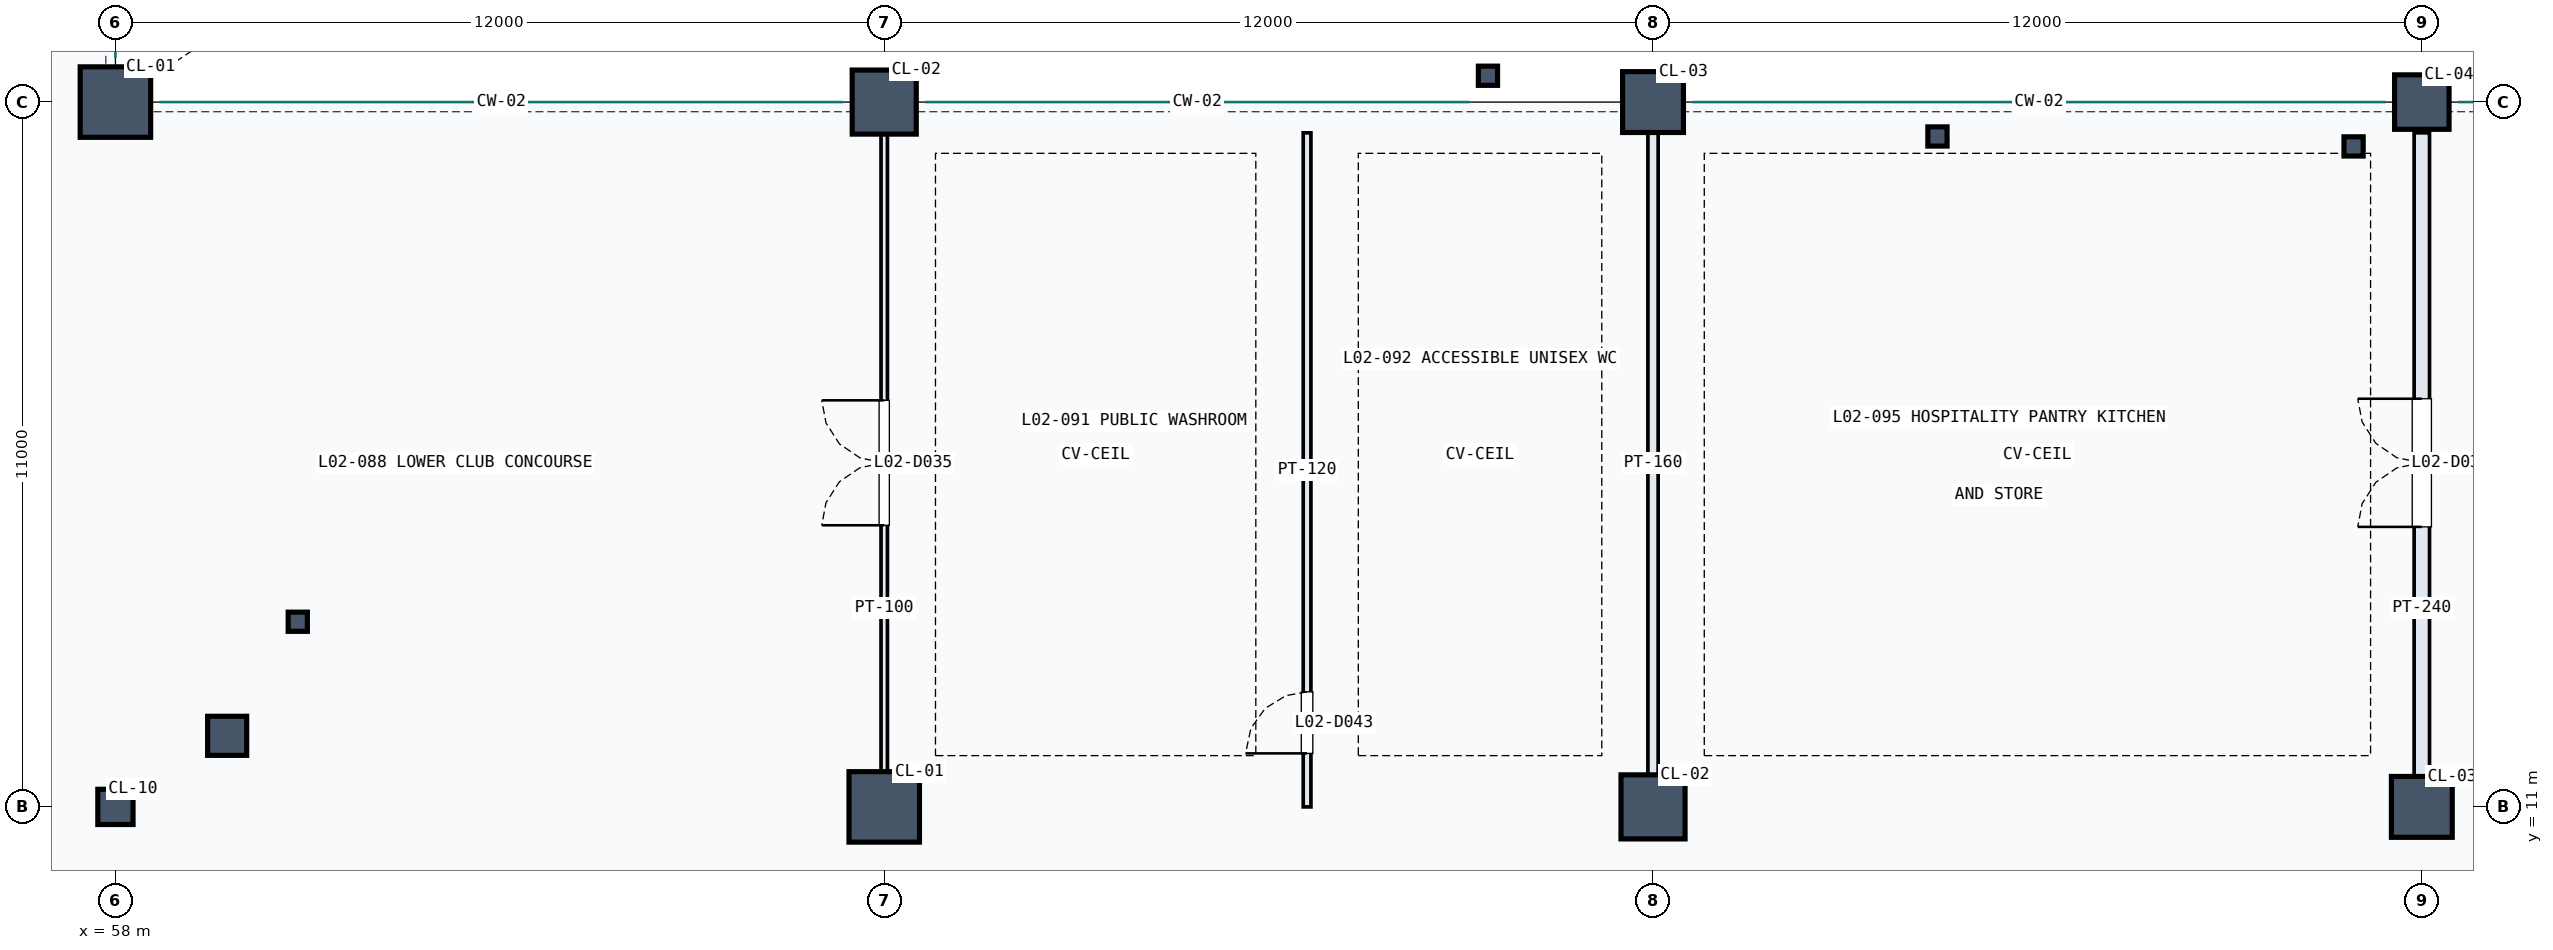
"""IFC4 building model, lengths in metres.
Left out: names, types, materials, properties, quantities, classifications, styles, units other than length and angle.
Written with IfcOpenShell. Run it as: python <this file> out.ifc"""

import sys

from ifc_helpers import new_model, si_unit, direction, frame, frame_2d, origin, origin_2d, place, context, subcontext, project, spatial, rectangle, hollow_rectangle, hollow_circle, extrude, element, fill, save


model = new_model("IFC4")
c1 = context("Model", 3, precision=1e-05, world=origin(), true_north=direction((0.0, 1.0)))
c2 = subcontext(c1, "Body", "Model", "MODEL_VIEW")
j1 = project(units=[si_unit("LENGTHUNIT", "METRE"), si_unit("PLANEANGLEUNIT", "RADIAN")], contexts=[c1])
p1 = place(None, origin())
s1 = spatial("IfcSite", under=j1, at=p1, CompositionType="ELEMENT")
p2 = place(p1, origin())
s2 = spatial("IfcBuilding", under=s1, at=p2, CompositionType="ELEMENT")
p3 = place(p2, frame((0.0, 0.0, 10.2)))
s3 = spatial("IfcBuildingStorey", under=s2, at=p3, CompositionType="ELEMENT", Elevation=10.2)
p4 = place(p3, frame((58.0, 11.0, 0.0), z_axis=(0.0, 0.0, 1.0), x_axis=(1.0, 0.0, 0.0)))
e1 = element("IfcColumn", 1, at=p4, inside=s3, PredefinedType="COLUMN", context=c2, shape_type="SweptSolid", body=[
    extrude(rectangle(XDim=0.55, YDim=0.55, at=origin_2d()), origin(), (0.0, 0.0, 1.0), 4.5),
])
for number, where, z_axis, x_axis in (
    (2, (58.0, 22.0, 0.0), (0.0, 0.0, 1.0), (1.0, 0.0, 0.0)),
    (3, (70.0, 11.0, 0.0), (0.0, 0.0, 1.0), (1.0, 0.0, 0.0)),
):
    element("IfcColumn", number, at=place(p3, frame(where, z_axis=z_axis, x_axis=x_axis)), inside=s3, PredefinedType="COLUMN", context=c2, shape_type="SweptSolid", body=[
        extrude(rectangle(XDim=1.1, YDim=1.1, at=origin_2d()), origin(), (0.0, 0.0, 1.0), 4.5),
    ])
for number, where, z_axis, x_axis in (
    (4, (70.0, 22.0, 0.0), (0.0, 0.0, 1.0), (1.0, 0.0, 0.0)),
    (5, (82.0, 11.0, 0.0), (0.0, 0.0, 1.0), (1.0, 0.0, 0.0)),
):
    element("IfcColumn", number, at=place(p3, frame(where, z_axis=z_axis, x_axis=x_axis)), inside=s3, PredefinedType="COLUMN", context=c2, shape_type="SweptSolid", body=[
        extrude(rectangle(XDim=1.0, YDim=1.0, at=origin_2d()), origin(), (0.0, 0.0, 1.0), 4.5),
    ])
for number, where, z_axis, x_axis in (
    (6, (82.0, 22.0, 0.0), (0.0, 0.0, 1.0), (1.0, 0.0, 0.0)),
    (7, (94.0, 11.0, 0.0), (0.0, 0.0, 1.0), (1.0, 0.0, 0.0)),
):
    element("IfcColumn", number, at=place(p3, frame(where, z_axis=z_axis, x_axis=x_axis)), inside=s3, PredefinedType="COLUMN", context=c2, shape_type="SweptSolid", body=[
        extrude(rectangle(XDim=0.95, YDim=0.95, at=origin_2d()), origin(), (0.0, 0.0, 1.0), 4.5),
    ])
p5 = place(p3, frame((94.0, 22.0, 0.0), z_axis=(0.0, 0.0, 1.0), x_axis=(1.0, 0.0, 0.0)))
e8 = element("IfcColumn", 8, at=p5, inside=s3, PredefinedType="COLUMN", context=c2, shape_type="SweptSolid", body=[
    extrude(rectangle(XDim=0.85, YDim=0.85, at=origin_2d()), origin(), (0.0, 0.0, 1.0), 4.5),
])
p6 = place(p3, frame((59.744, 12.109, 0.0), z_axis=(0.0, 0.0, 1.0), x_axis=(1.0, 0.0, 0.0)))
e9 = element("IfcColumn", 9, at=p6, inside=s3, PredefinedType="COLUMN", context=c2, shape_type="SweptSolid", body=[
    extrude(hollow_circle(Radius=0.305, WallThickness=0.025, at=origin_2d()), origin(), (0.0, 0.0, 1.0), 4.5),
])
for number, where, z_axis, x_axis in (
    (10, (79.423, 22.411, 0.0), (0.0, 0.0, 1.0), (1.0, 0.0, 0.0)),
    (11, (86.44, 21.463, 0.0), (0.0, 0.0, 1.0), (1.0, 0.0, 0.0)),
    (12, (92.935, 21.308, 0.0), (0.0, 0.0, 1.0), (1.0, 0.0, 0.0)),
    (13, (60.846, 13.89, 0.0), (0.0, 0.0, 1.0), (1.0, 0.0, 0.0)),
):
    element("IfcColumn", number, at=place(p3, frame(where, z_axis=z_axis, x_axis=x_axis)), inside=s3, PredefinedType="COLUMN", context=c2, shape_type="SweptSolid", body=[
        extrude(hollow_rectangle(XDim=0.3, YDim=0.3, WallThickness=0.016, at=origin_2d()), origin(), (0.0, 0.0, 1.0), 4.5),
    ])
p7 = place(p3, frame((70.0, 11.22, 0.0), z_axis=(0.0, 0.0, 1.0), x_axis=(0.0, 1.0, 0.0)))
e14 = element("IfcWall", 14, at=p7, inside=s3, PredefinedType="PARTITIONING", context=c2, shape_type="SweptSolid", body=[
    extrude(rectangle(XDim=10.3, YDim=0.1, at=frame_2d((5.15, 0.0))), origin(), (0.0, 0.0, 1.0), 3.49),
])
p8 = place(p7, frame((4.175, 0.0, 0.0)))
e15 = element("IfcOpeningElement", 15, at=p8, cuts=e14, PredefinedType="OPENING", context=c2, shape_type="SweptSolid", body=[
    extrude(rectangle(XDim=1.95, YDim=2.4, at=frame_2d((0.975, 1.2))), frame((0.0, 0.06, 0.0), z_axis=(0.0, -1.0, 0.0), x_axis=(1.0, 0.0, 0.0)), (0.0, 0.0, 1.0), 0.12),
])
p9 = place(p3, frame((94.0, 11.22, 0.0), z_axis=(0.0, 0.0, 1.0), x_axis=(0.0, 1.0, 0.0)))
e16 = element("IfcWall", 16, at=p9, inside=s3, PredefinedType="PARTITIONING", context=c2, shape_type="SweptSolid", body=[
    extrude(rectangle(XDim=10.3, YDim=0.24, at=frame_2d((5.15, 0.0))), origin(), (0.0, 0.0, 1.0), 3.39),
])
p10 = place(p9, frame((4.15, 0.0, 0.0)))
e17 = element("IfcOpeningElement", 17, at=p10, cuts=e16, PredefinedType="OPENING", context=c2, shape_type="SweptSolid", body=[
    extrude(rectangle(XDim=2.0, YDim=2.25, at=frame_2d((1.0, 1.125))), frame((0.0, 0.13, 0.0), z_axis=(0.0, -1.0, 0.0), x_axis=(1.0, 0.0, 0.0)), (0.0, 0.0, 1.0), 0.26),
])
p11 = place(p3, frame((76.6, 11.0, 0.0), z_axis=(0.0, 0.0, 1.0), x_axis=(0.0, 1.0, 0.0)))
e18 = element("IfcWall", 18, at=p11, inside=s3, PredefinedType="PARTITIONING", context=c2, shape_type="SweptSolid", body=[
    extrude(rectangle(XDim=10.52, YDim=0.12, at=frame_2d((5.26, 0.0))), origin(), (0.0, 0.0, 1.0), 3.49),
])
p12 = place(p11, frame((0.835, 0.0, 0.0)))
e19 = element("IfcOpeningElement", 19, at=p12, cuts=e18, PredefinedType="OPENING", context=c2, shape_type="SweptSolid", body=[
    extrude(rectangle(XDim=0.96, YDim=2.15, at=frame_2d((0.48, 1.075))), frame((0.0, 0.07, 0.0), z_axis=(0.0, -1.0, 0.0), x_axis=(1.0, 0.0, 0.0)), (0.0, 0.0, 1.0), 0.14),
])
p13 = place(p3, frame((82.0, 11.22, 0.0), z_axis=(0.0, 0.0, 1.0), x_axis=(0.0, 1.0, 0.0)))
e20 = element("IfcWall", 20, at=p13, inside=s3, PredefinedType="PARTITIONING", context=c2, shape_type="SweptSolid", body=[
    extrude(rectangle(XDim=10.3, YDim=0.16, at=frame_2d((5.15, 0.0))), origin(), (0.0, 0.0, 1.0), 3.14),
])
p14 = place(p8, origin())
e21 = element("IfcDoor", 21, at=p14, inside=s3, OperationType="DOUBLE_DOOR_SINGLE_SWING", PredefinedType="DOOR", context=c2, shape_type="SweptSolid", body=[
    extrude(rectangle(XDim=1.95, YDim=2.4, at=frame_2d((0.975, 1.2))), frame((0.0, 0.025, 0.0), z_axis=(0.0, -1.0, 0.0), x_axis=(1.0, 0.0, 0.0)), (0.0, 0.0, 1.0), 0.05),
])
fill(e15, e21)
p15 = place(p10, origin())
e22 = element("IfcDoor", 22, at=p15, inside=s3, OperationType="DOUBLE_DOOR_SINGLE_SWING", PredefinedType="DOOR", context=c2, shape_type="SweptSolid", body=[
    extrude(rectangle(XDim=2.0, YDim=2.25, at=frame_2d((1.0, 1.125))), frame((0.0, 0.025, 0.0), z_axis=(0.0, -1.0, 0.0), x_axis=(1.0, 0.0, 0.0)), (0.0, 0.0, 1.0), 0.05),
])
fill(e17, e22)
p16 = place(p12, origin())
e23 = element("IfcDoor", 23, at=p16, inside=s3, OperationType="SINGLE_SWING_LEFT", PredefinedType="DOOR", context=c2, shape_type="SweptSolid", body=[
    extrude(rectangle(XDim=0.96, YDim=2.15, at=frame_2d((0.48, 1.075))), frame((0.0, 0.025, 0.0), z_axis=(0.0, -1.0, 0.0), x_axis=(1.0, 0.0, 0.0)), (0.0, 0.0, 1.0), 0.05),
])
fill(e19, e23)
save(model, sys.argv[1])
